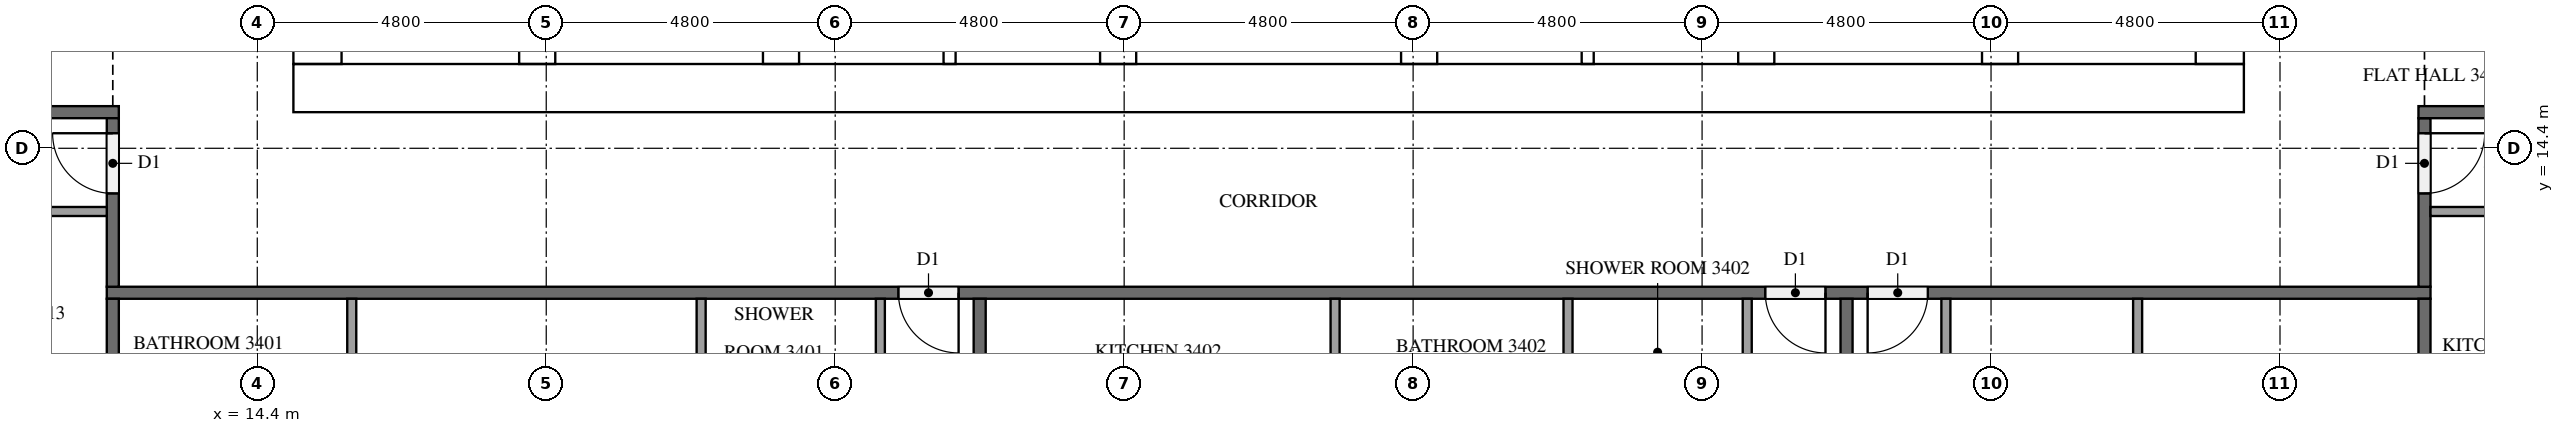
"""IFC4 building model, lengths in metres.
Left out: names, types, materials, properties, quantities, classifications, styles, units other than length and angle.
Written with IfcOpenShell. Run it as: python <this file> out.ifc"""

import sys

from ifc_helpers import new_model, si_unit, direction, frame, frame_2d, origin, place, context, subcontext, project, spatial, rectangle, extrude, element, fill, save


model = new_model("IFC4")
c1 = context("Model", 3, precision=1e-05, world=origin(), true_north=direction((0.0, 1.0)))
c2 = subcontext(c1, "Body", "Model", "MODEL_VIEW")
j1 = project(units=[si_unit("LENGTHUNIT", "METRE"), si_unit("PLANEANGLEUNIT", "RADIAN")], contexts=[c1])
p1 = place(None, origin())
s1 = spatial("IfcSite", under=j1, at=p1, CompositionType="ELEMENT")
p2 = place(p1, origin())
s2 = spatial("IfcBuilding", under=s1, at=p2, CompositionType="ELEMENT")
p3 = place(p2, frame((0.0, 0.0, 133.1)))
s3 = spatial("IfcBuildingStorey", under=s2, at=p3, CompositionType="ELEMENT", Elevation=133.1)
p4 = place(p3, frame((15.0, 15.4, 0.0), z_axis=(0.0, 0.0, 1.0), x_axis=(1.0, 0.0, 0.0)))
e1 = element("IfcWall", 1, at=p4, inside=s3, PredefinedType="SHEAR", context=c2, shape_type="SweptSolid", body=[
    extrude(rectangle(XDim=32.4, YDim=0.8, at=frame_2d((16.2, 0.0))), origin(), (0.0, 0.0, 1.0), 3.2),
])
p5 = place(p4, frame((15.3, 0.0, 0.0)))
e2 = element("IfcOpeningElement", 2, at=p5, cuts=e1, PredefinedType="OPENING", context=c2, shape_type="SweptSolid", body=[
    extrude(rectangle(XDim=1.8, YDim=2.1, at=frame_2d((0.9, 1.05))), frame((0.0, 0.41, 0.0), z_axis=(0.0, -1.0, 0.0), x_axis=(1.0, 0.0, 0.0)), (0.0, 0.0, 1.0), 0.82),
])
p6 = place(p3, frame((15.4, 15.8, 0.0), z_axis=(0.0, 0.0, 1.0), x_axis=(0.0, 1.0, 0.0)))
e3 = element("IfcWall", 3, at=p6, inside=s3, PredefinedType="SHEAR", context=c2, shape_type="SweptSolid", body=[
    extrude(rectangle(XDim=21.2, YDim=0.8, at=frame_2d((10.6, 0.0))), origin(), (0.0, 0.0, 1.0), 3.2),
])
p7 = place(p6, frame((4.96, 0.0, 0.0)))
e4 = element("IfcOpeningElement", 4, at=p7, cuts=e3, PredefinedType="OPENING", context=c2, shape_type="SweptSolid", body=[
    extrude(rectangle(XDim=1.2, YDim=2.1, at=frame_2d((0.6, 1.05))), frame((0.0, 0.41, 0.0), z_axis=(0.0, -1.0, 0.0), x_axis=(1.0, 0.0, 0.0)), (0.0, 0.0, 1.0), 0.82),
])
p8 = place(p3, frame((47.0, 15.8, 0.0), z_axis=(0.0, 0.0, 1.0), x_axis=(0.0, 1.0, 0.0)))
e5 = element("IfcWall", 5, at=p8, inside=s3, PredefinedType="SHEAR", context=c2, shape_type="SweptSolid", body=[
    extrude(rectangle(XDim=21.2, YDim=0.8, at=frame_2d((10.6, 0.0))), origin(), (0.0, 0.0, 1.0), 3.2),
])
p9 = place(p8, frame((10.3, 0.0, 0.0)))
e6 = element("IfcOpeningElement", 6, at=p9, cuts=e5, PredefinedType="OPENING", context=c2, shape_type="SweptSolid", body=[
    extrude(rectangle(XDim=1.2, YDim=2.1, at=frame_2d((0.6, 1.05))), frame((0.0, 0.41, 0.0), z_axis=(0.0, -1.0, 0.0), x_axis=(1.0, 0.0, 0.0)), (0.0, 0.0, 1.0), 0.82),
])
p10 = place(p3, frame((19.05, 15.8, 0.0), z_axis=(0.0, 0.0, 1.0), x_axis=(0.0, 1.0, 0.0)))
e7 = element("IfcWall", 7, at=p10, inside=s3, PredefinedType="SHEAR", context=c2, shape_type="SweptSolid", body=[
    extrude(rectangle(XDim=15.15, YDim=0.6, at=frame_2d((7.575, 0.0))), origin(), (0.0, 0.0, 1.0), 3.2),
])
p11 = place(p10, frame((9.65, 0.0, 0.0)))
e8 = element("IfcOpeningElement", 8, at=p11, cuts=e7, PredefinedType="OPENING", context=c2, shape_type="SweptSolid", body=[
    extrude(rectangle(XDim=1.1, YDim=2.1, at=frame_2d((0.55, 1.05))), frame((0.0, 0.31, 0.0), z_axis=(0.0, -1.0, 0.0), x_axis=(1.0, 0.0, 0.0)), (0.0, 0.0, 1.0), 0.62),
])
p12 = place(p10, frame((13.15, 0.0, 0.0)))
e9 = element("IfcOpeningElement", 9, at=p12, cuts=e7, PredefinedType="OPENING", context=c2, shape_type="SweptSolid", body=[
    extrude(rectangle(XDim=1.1, YDim=2.1, at=frame_2d((0.55, 1.05))), frame((0.0, 0.31, 0.0), z_axis=(0.0, -1.0, 0.0), x_axis=(1.0, 0.0, 0.0)), (0.0, 0.0, 1.0), 0.62),
])
p13 = place(p10, frame((0.4, 0.0, 0.0)))
e10 = element("IfcOpeningElement", 10, at=p13, cuts=e7, PredefinedType="OPENING", context=c2, shape_type="SweptSolid", body=[
    extrude(rectangle(XDim=1.2, YDim=2.1, at=frame_2d((0.6, 1.05))), frame((0.0, 0.31, 0.0), z_axis=(0.0, -1.0, 0.0), x_axis=(1.0, 0.0, 0.0)), (0.0, 0.0, 1.0), 0.62),
])
p14 = place(p3, frame((23.1, 15.8, 0.0), z_axis=(0.0, 0.0, 1.0), x_axis=(0.0, 1.0, 0.0)))
e11 = element("IfcWall", 11, at=p14, inside=s3, PredefinedType="SHEAR", context=c2, shape_type="SweptSolid", body=[
    extrude(rectangle(XDim=21.2, YDim=0.6, at=frame_2d((10.6, 0.0))), origin(), (0.0, 0.0, 1.0), 3.2),
])
p15 = place(p3, frame((39.3, 15.8, 0.0), z_axis=(0.0, 0.0, 1.0), x_axis=(0.0, 1.0, 0.0)))
e12 = element("IfcWall", 12, at=p15, inside=s3, PredefinedType="SHEAR", context=c2, shape_type="SweptSolid", body=[
    extrude(rectangle(XDim=8.45, YDim=0.6, at=frame_2d((4.225, 0.0))), origin(), (0.0, 0.0, 1.0), 3.2),
])
p16 = place(p3, frame((43.35, 15.8, 0.0), z_axis=(0.0, 0.0, 1.0), x_axis=(0.0, 1.0, 0.0)))
e13 = element("IfcWall", 13, at=p16, inside=s3, PredefinedType="SHEAR", context=c2, shape_type="SweptSolid", body=[
    extrude(rectangle(XDim=8.45, YDim=0.6, at=frame_2d((4.225, 0.0))), origin(), (0.0, 0.0, 1.0), 3.2),
])
p17 = place(p16, frame((0.4, 0.0, 0.0)))
e14 = element("IfcOpeningElement", 14, at=p17, cuts=e13, PredefinedType="OPENING", context=c2, shape_type="SweptSolid", body=[
    extrude(rectangle(XDim=1.2, YDim=2.1, at=frame_2d((0.6, 1.05))), frame((0.0, 0.31, 0.0), z_axis=(0.0, -1.0, 0.0), x_axis=(1.0, 0.0, 0.0)), (0.0, 0.0, 1.0), 0.62),
])
for number, where, z_axis, x_axis in (
    (15, (28.7, 15.8, 0.0), (0.0, 0.0, 1.0), (0.0, 1.0, 0.0)),
    (16, (33.7, 15.8, 0.0), (0.0, 0.0, 1.0), (0.0, 1.0, 0.0)),
):
    element("IfcWall", number, at=place(p3, frame(where, z_axis=z_axis, x_axis=x_axis)), inside=s3, PredefinedType="SHEAR", context=c2, shape_type="SweptSolid", body=[
        extrude(rectangle(XDim=2.65, YDim=0.6, at=frame_2d((1.325, 0.0))), origin(), (0.0, 0.0, 1.0), 3.2),
    ])
for number, where, z_axis, x_axis in (
    (17, (25.9, 15.8, 0.0), (0.0, 0.0, 1.0), (0.0, 1.0, 0.0)),
    (18, (36.5, 15.8, 0.0), (0.0, 0.0, 1.0), (0.0, 1.0, 0.0)),
):
    element("IfcWall", number, at=place(p3, frame(where, z_axis=z_axis, x_axis=x_axis)), inside=s3, PredefinedType="SOLIDWALL", context=c2, shape_type="SweptSolid", body=[
        extrude(rectangle(XDim=2.65, YDim=0.2, at=frame_2d((1.325, 0.0))), origin(), (0.0, 0.0, 1.0), 3.2),
    ])
p18 = place(p3, frame((50.5, 12.0, 0.0), z_axis=(0.0, 0.0, 1.0), x_axis=(-1.0, 0.0, 0.0)))
e19 = element("IfcWall", 19, at=p18, inside=s3, PredefinedType="PARTITIONING", context=c2, shape_type="SweptSolid", body=[
    extrude(rectangle(XDim=38.6, YDim=0.2, at=frame_2d((19.3, 0.0))), origin(), (0.0, 0.0, 1.0), 3.2),
])
p19 = place(p18, frame((24.45, 0.0, 0.0)))
e20 = element("IfcOpeningElement", 20, at=p19, cuts=e19, PredefinedType="OPENING", context=c2, shape_type="SweptSolid", body=[
    extrude(rectangle(XDim=1.0, YDim=2.1, at=frame_2d((0.5, 1.05))), frame((0.0, 0.11, 0.0), z_axis=(0.0, -1.0, 0.0), x_axis=(1.0, 0.0, 0.0)), (0.0, 0.0, 1.0), 0.22),
])
p20 = place(p18, frame((10.05, 0.0, 0.0)))
e21 = element("IfcOpeningElement", 21, at=p20, cuts=e19, PredefinedType="OPENING", context=c2, shape_type="SweptSolid", body=[
    extrude(rectangle(XDim=1.0, YDim=2.1, at=frame_2d((0.5, 1.05))), frame((0.0, 0.11, 0.0), z_axis=(0.0, -1.0, 0.0), x_axis=(1.0, 0.0, 0.0)), (0.0, 0.0, 1.0), 0.22),
])
p21 = place(p18, frame((8.35, 0.0, 0.0)))
e22 = element("IfcOpeningElement", 22, at=p21, cuts=e19, PredefinedType="OPENING", context=c2, shape_type="SweptSolid", body=[
    extrude(rectangle(XDim=1.0, YDim=2.1, at=frame_2d((0.5, 1.05))), frame((0.0, 0.11, 0.0), z_axis=(0.0, -1.0, 0.0), x_axis=(1.0, 0.0, 0.0)), (0.0, 0.0, 1.0), 0.22),
])
p22 = place(p3, frame((50.4, 14.9, 0.0), z_axis=(0.0, 0.0, 1.0), x_axis=(0.0, -1.0, 0.0)))
e23 = element("IfcWall", 23, at=p22, inside=s3, PredefinedType="PARTITIONING", context=c2, shape_type="SweptSolid", body=[
    extrude(rectangle(XDim=2.8, YDim=0.2, at=frame_2d((1.4, 0.0))), origin(), (0.0, 0.0, 1.0), 3.2),
])
p23 = place(p22, frame((0.25, 0.0, 0.0)))
e24 = element("IfcOpeningElement", 24, at=p23, cuts=e23, PredefinedType="OPENING", context=c2, shape_type="SweptSolid", body=[
    extrude(rectangle(XDim=1.0, YDim=2.1, at=frame_2d((0.5, 1.05))), frame((0.0, 0.11, 0.0), z_axis=(0.0, -1.0, 0.0), x_axis=(1.0, 0.0, 0.0)), (0.0, 0.0, 1.0), 0.22),
])
p24 = place(p3, frame((50.3, 15.0, 0.0), z_axis=(0.0, 0.0, 1.0), x_axis=(1.0, 0.0, 0.0)))
e25 = element("IfcWall", 25, at=p24, inside=s3, PredefinedType="PARTITIONING", context=c2, shape_type="SweptSolid", body=[
    extrude(rectangle(XDim=2.2, YDim=0.2, at=frame_2d((1.1, 0.0))), origin(), (0.0, 0.0, 1.0), 3.2),
])
p25 = place(p3, frame((9.9, 15.0, 0.0), z_axis=(0.0, 0.0, 1.0), x_axis=(1.0, 0.0, 0.0)))
e26 = element("IfcWall", 26, at=p25, inside=s3, PredefinedType="PARTITIONING", context=c2, shape_type="SweptSolid", body=[
    extrude(rectangle(XDim=2.2, YDim=0.2, at=frame_2d((1.1, 0.0))), origin(), (0.0, 0.0, 1.0), 3.2),
])
p26 = place(p3, frame((12.0, 12.1, 0.0), z_axis=(0.0, 0.0, 1.0), x_axis=(0.0, 1.0, 0.0)))
e27 = element("IfcWall", 27, at=p26, inside=s3, PredefinedType="PARTITIONING", context=c2, shape_type="SweptSolid", body=[
    extrude(rectangle(XDim=2.8, YDim=0.2, at=frame_2d((1.4, 0.0))), origin(), (0.0, 0.0, 1.0), 3.2),
])
p27 = place(p26, frame((1.55, 0.0, 0.0)))
e28 = element("IfcOpeningElement", 28, at=p27, cuts=e27, PredefinedType="OPENING", context=c2, shape_type="SweptSolid", body=[
    extrude(rectangle(XDim=1.0, YDim=2.1, at=frame_2d((0.5, 1.05))), frame((0.0, 0.11, 0.0), z_axis=(0.0, -1.0, 0.0), x_axis=(1.0, 0.0, 0.0)), (0.0, 0.0, 1.0), 0.22),
])
for number, where, z_axis, x_axis in (
    (29, (26.4, 11.9, 0.0), (0.0, 0.0, 1.0), (0.0, -1.0, 0.0)),
    (30, (12.0, 4.9, 0.0), (0.0, 0.0, 1.0), (0.0, 1.0, 0.0)),
    (31, (40.8, 11.9, 0.0), (0.0, 0.0, 1.0), (0.0, -1.0, 0.0)),
    (32, (50.4, 11.9, 0.0), (0.0, 0.0, 1.0), (0.0, -1.0, 0.0)),
):
    element("IfcWall", number, at=place(p3, frame(where, z_axis=z_axis, x_axis=x_axis)), inside=s3, PredefinedType="PARTITIONING", context=c2, shape_type="SweptSolid", body=[
        extrude(rectangle(XDim=7.0, YDim=0.2, at=frame_2d((3.5, 0.0))), origin(), (0.0, 0.0, 1.0), 3.2),
    ])
for number, where, z_axis, x_axis in (
    (33, (21.773, 11.9, 0.0), (0.0, 0.0, 1.0), (0.0, -1.0, 0.0)),
    (34, (15.969, 11.9, 0.0), (0.0, 0.0, 1.0), (0.0, -1.0, 0.0)),
):
    element("IfcWall", number, at=place(p3, frame(where, z_axis=z_axis, x_axis=x_axis)), inside=s3, PredefinedType="PARTITIONING", context=c2, shape_type="SweptSolid", body=[
        extrude(rectangle(XDim=2.075, YDim=0.15, at=frame_2d((1.038, 0.0))), origin(), (0.0, 0.0, 1.0), 3.2),
    ])
p28 = place(p3, frame((24.75, 11.9, 0.0), z_axis=(0.0, 0.0, 1.0), x_axis=(0.0, -1.0, 0.0)))
e35 = element("IfcWall", 35, at=p28, inside=s3, PredefinedType="PARTITIONING", context=c2, shape_type="SweptSolid", body=[
    extrude(rectangle(XDim=2.225, YDim=0.15, at=frame_2d((1.112, 0.0))), origin(), (0.0, 0.0, 1.0), 3.2),
])
for number, where, z_axis, x_axis in (
    (36, (36.173, 11.9, 0.0), (0.0, 0.0, 1.0), (0.0, -1.0, 0.0)),
    (37, (32.304, 11.9, 0.0), (0.0, 0.0, 1.0), (0.0, -1.0, 0.0)),
):
    element("IfcWall", number, at=place(p3, frame(where, z_axis=z_axis, x_axis=x_axis)), inside=s3, PredefinedType="PARTITIONING", context=c2, shape_type="SweptSolid", body=[
        extrude(rectangle(XDim=1.775, YDim=0.15, at=frame_2d((0.887, 0.0))), origin(), (0.0, 0.0, 1.0), 3.2),
    ])
p29 = place(p3, frame((39.15, 11.9, 0.0), z_axis=(0.0, 0.0, 1.0), x_axis=(0.0, -1.0, 0.0)))
e38 = element("IfcWall", 38, at=p29, inside=s3, PredefinedType="PARTITIONING", context=c2, shape_type="SweptSolid", body=[
    extrude(rectangle(XDim=1.925, YDim=0.15, at=frame_2d((0.962, 0.0))), origin(), (0.0, 0.0, 1.0), 3.2),
])
p30 = place(p3, frame((45.635, 11.9, 0.0), z_axis=(0.0, 0.0, 1.0), x_axis=(0.0, -1.0, 0.0)))
e39 = element("IfcWall", 39, at=p30, inside=s3, PredefinedType="PARTITIONING", context=c2, shape_type="SweptSolid", body=[
    extrude(rectangle(XDim=2.075, YDim=0.15, at=frame_2d((1.038, 0.0))), origin(), (0.0, 0.0, 1.0), 3.2),
])
p31 = place(p3, frame((42.45, 11.9, 0.0), z_axis=(0.0, 0.0, 1.0), x_axis=(0.0, -1.0, 0.0)))
e40 = element("IfcWall", 40, at=p31, inside=s3, PredefinedType="PARTITIONING", context=c2, shape_type="SweptSolid", body=[
    extrude(rectangle(XDim=2.225, YDim=0.15, at=frame_2d((1.112, 0.0))), origin(), (0.0, 0.0, 1.0), 3.2),
])
p32 = place(p3, frame((50.5, 13.35, 0.0), z_axis=(0.0, 0.0, 1.0), x_axis=(1.0, 0.0, 0.0)))
e41 = element("IfcWall", 41, at=p32, inside=s3, PredefinedType="PARTITIONING", context=c2, shape_type="SweptSolid", body=[
    extrude(rectangle(XDim=1.925, YDim=0.15, at=frame_2d((0.962, 0.0))), origin(), (0.0, 0.0, 1.0), 3.2),
])
p33 = place(p3, frame((11.9, 13.35, 0.0), z_axis=(0.0, 0.0, 1.0), x_axis=(-1.0, 0.0, 0.0)))
e42 = element("IfcWall", 42, at=p33, inside=s3, PredefinedType="PARTITIONING", context=c2, shape_type="SweptSolid", body=[
    extrude(rectangle(XDim=4.025, YDim=0.15, at=frame_2d((2.012, 0.0))), origin(), (0.0, 0.0, 1.0), 3.2),
])
p34 = place(p5, frame((1.8, 0.0, 0.0), z_axis=(0.0, 0.0, 1.0), x_axis=(-1.0, 0.0, 0.0)))
e43 = element("IfcDoor", 43, at=p34, inside=s3, OperationType="DOUBLE_DOOR_SINGLE_SWING", PredefinedType="DOOR", context=c2, shape_type="SweptSolid", body=[
    extrude(rectangle(XDim=1.8, YDim=2.1, at=frame_2d((0.9, 1.05))), frame((0.0, 0.025, 0.0), z_axis=(0.0, -1.0, 0.0), x_axis=(1.0, 0.0, 0.0)), (0.0, 0.0, 1.0), 0.05),
])
fill(e2, e43)
p35 = place(p19, origin())
e44 = element("IfcDoor", 44, at=p35, inside=s3, OperationType="SINGLE_SWING_LEFT", PredefinedType="DOOR", context=c2, shape_type="SweptSolid", body=[
    extrude(rectangle(XDim=1.0, YDim=2.1, at=frame_2d((0.5, 1.05))), frame((0.0, 0.025, 0.0), z_axis=(0.0, -1.0, 0.0), x_axis=(1.0, 0.0, 0.0)), (0.0, 0.0, 1.0), 0.05),
])
fill(e20, e44)
p36 = place(p20, origin())
e45 = element("IfcDoor", 45, at=p36, inside=s3, OperationType="SINGLE_SWING_LEFT", PredefinedType="DOOR", context=c2, shape_type="SweptSolid", body=[
    extrude(rectangle(XDim=1.0, YDim=2.1, at=frame_2d((0.5, 1.05))), frame((0.0, 0.025, 0.0), z_axis=(0.0, -1.0, 0.0), x_axis=(1.0, 0.0, 0.0)), (0.0, 0.0, 1.0), 0.05),
])
fill(e21, e45)
p37 = place(p21, origin())
e46 = element("IfcDoor", 46, at=p37, inside=s3, OperationType="SINGLE_SWING_RIGHT", PredefinedType="DOOR", context=c2, shape_type="SweptSolid", body=[
    extrude(rectangle(XDim=1.0, YDim=2.1, at=frame_2d((0.5, 1.05))), frame((0.0, 0.025, 0.0), z_axis=(0.0, -1.0, 0.0), x_axis=(1.0, 0.0, 0.0)), (0.0, 0.0, 1.0), 0.05),
])
fill(e22, e46)
p38 = place(p23, origin())
e47 = element("IfcDoor", 47, at=p38, inside=s3, OperationType="SINGLE_SWING_LEFT", PredefinedType="DOOR", context=c2, shape_type="SweptSolid", body=[
    extrude(rectangle(XDim=1.0, YDim=2.1, at=frame_2d((0.5, 1.05))), frame((0.0, 0.025, 0.0), z_axis=(0.0, -1.0, 0.0), x_axis=(1.0, 0.0, 0.0)), (0.0, 0.0, 1.0), 0.05),
])
fill(e24, e47)
p39 = place(p27, origin())
e48 = element("IfcDoor", 48, at=p39, inside=s3, OperationType="SINGLE_SWING_RIGHT", PredefinedType="DOOR", context=c2, shape_type="SweptSolid", body=[
    extrude(rectangle(XDim=1.0, YDim=2.1, at=frame_2d((0.5, 1.05))), frame((0.0, 0.025, 0.0), z_axis=(0.0, -1.0, 0.0), x_axis=(1.0, 0.0, 0.0)), (0.0, 0.0, 1.0), 0.05),
])
fill(e28, e48)
save(model, sys.argv[1])
